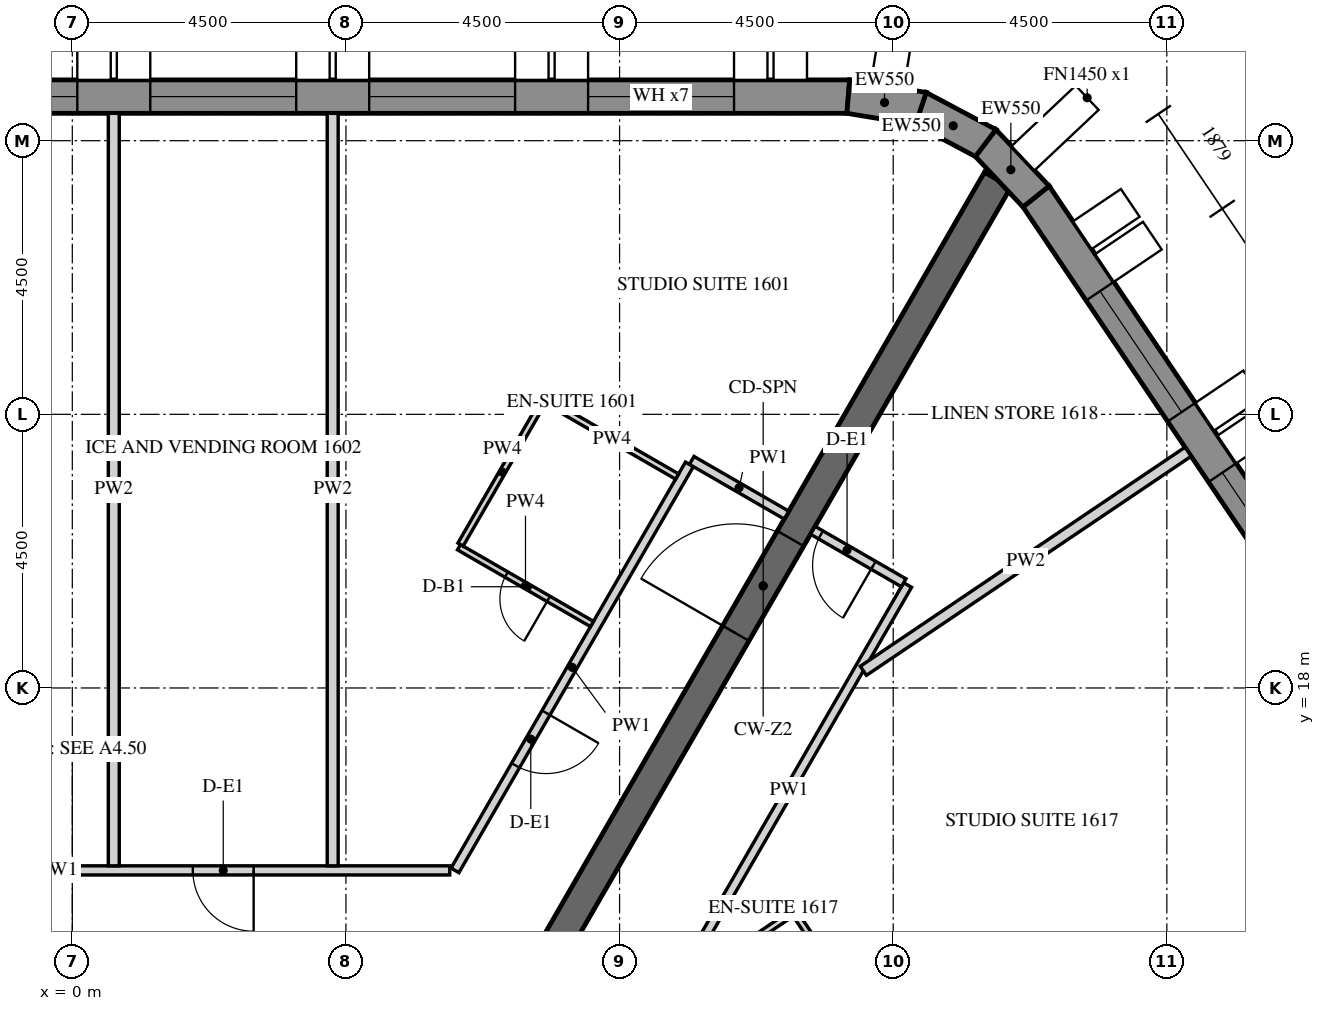
"""IFC4 building model, lengths in metres.
Left out: names, types, materials, properties, quantities, classifications, styles, units other than length and angle.
Written with IfcOpenShell. Run it as: python <this file> out.ifc"""

import sys

from ifc_helpers import new_model, si_unit, direction, frame, frame_2d, origin, place, context, subcontext, project, spatial, polyline, rectangle, outline, extrude, element, fill, save


model = new_model("IFC4")
c1 = context("Model", 3, precision=1e-05, world=origin(), true_north=direction((0.0, 1.0)))
c2 = subcontext(c1, "Body", "Model", "MODEL_VIEW")
j1 = project(units=[si_unit("LENGTHUNIT", "METRE"), si_unit("PLANEANGLEUNIT", "RADIAN")], contexts=[c1])
p1 = place(None, origin())
s1 = spatial("IfcSite", under=j1, at=p1, CompositionType="ELEMENT")
p2 = place(p1, origin())
s2 = spatial("IfcBuilding", under=s1, at=p2, CompositionType="ELEMENT")
p3 = place(p2, frame((0.0, 0.0, 207.3)))
s3 = spatial("IfcBuildingStorey", under=s2, at=p3, CompositionType="ELEMENT", Elevation=207.3)
p4 = place(p3, frame((12.761, 27.725, -0.15), z_axis=(0.0, 0.0, 1.0), x_axis=(-1.0, 0.0, 0.0)))
e1 = element("IfcWall", 1, at=p4, inside=s3, PredefinedType="SOLIDWALL", context=c2, shape_type="SweptSolid", body=[
    extrude(outline(polyline([(-0.022, -0.275), (27.783, -0.275), (27.732, 0.275), (0.022, 0.275), (-0.022, -0.275)])), origin(), (0.0, 0.0, 1.0), 3.9),
])
p5 = place(p4, frame((1.879, 0.0, 1.05)))
e2 = element("IfcOpeningElement", 2, at=p5, cuts=e1, PredefinedType="OPENING", context=c2, shape_type="SweptSolid", body=[
    extrude(rectangle(XDim=2.4, YDim=2.4, at=frame_2d((1.2, 1.2))), frame((0.0, 0.285, 0.0), z_axis=(0.0, -1.0, 0.0), x_axis=(1.0, 0.0, 0.0)), (0.0, 0.0, 1.0), 0.57),
])
p6 = place(p4, frame((5.479, 0.0, 1.05)))
e3 = element("IfcOpeningElement", 3, at=p6, cuts=e1, PredefinedType="OPENING", context=c2, shape_type="SweptSolid", body=[
    extrude(rectangle(XDim=2.4, YDim=2.4, at=frame_2d((1.2, 1.2))), frame((0.0, 0.285, 0.0), z_axis=(0.0, -1.0, 0.0), x_axis=(1.0, 0.0, 0.0)), (0.0, 0.0, 1.0), 0.57),
])
p7 = place(p4, frame((9.079, 0.0, 1.05)))
e4 = element("IfcOpeningElement", 4, at=p7, cuts=e1, PredefinedType="OPENING", context=c2, shape_type="SweptSolid", body=[
    extrude(rectangle(XDim=2.4, YDim=2.4, at=frame_2d((1.2, 1.2))), frame((0.0, 0.285, 0.0), z_axis=(0.0, -1.0, 0.0), x_axis=(1.0, 0.0, 0.0)), (0.0, 0.0, 1.0), 0.57),
])
p8 = place(p4, frame((12.679, 0.0, 1.05)))
e5 = element("IfcOpeningElement", 5, at=p8, cuts=e1, PredefinedType="OPENING", context=c2, shape_type="SweptSolid", body=[
    extrude(rectangle(XDim=2.4, YDim=2.4, at=frame_2d((1.2, 1.2))), frame((0.0, 0.285, 0.0), z_axis=(0.0, -1.0, 0.0), x_axis=(1.0, 0.0, 0.0)), (0.0, 0.0, 1.0), 0.57),
])
p9 = place(p4, frame((16.279, 0.0, 1.05)))
e6 = element("IfcOpeningElement", 6, at=p9, cuts=e1, PredefinedType="OPENING", context=c2, shape_type="SweptSolid", body=[
    extrude(rectangle(XDim=2.4, YDim=2.4, at=frame_2d((1.2, 1.2))), frame((0.0, 0.285, 0.0), z_axis=(0.0, -1.0, 0.0), x_axis=(1.0, 0.0, 0.0)), (0.0, 0.0, 1.0), 0.57),
])
p10 = place(p4, frame((19.879, 0.0, 1.05)))
e7 = element("IfcOpeningElement", 7, at=p10, cuts=e1, PredefinedType="OPENING", context=c2, shape_type="SweptSolid", body=[
    extrude(rectangle(XDim=2.4, YDim=2.4, at=frame_2d((1.2, 1.2))), frame((0.0, 0.285, 0.0), z_axis=(0.0, -1.0, 0.0), x_axis=(1.0, 0.0, 0.0)), (0.0, 0.0, 1.0), 0.57),
])
p11 = place(p4, frame((23.479, 0.0, 1.05)))
e8 = element("IfcOpeningElement", 8, at=p11, cuts=e1, PredefinedType="OPENING", context=c2, shape_type="SweptSolid", body=[
    extrude(rectangle(XDim=2.4, YDim=2.4, at=frame_2d((1.2, 1.2))), frame((0.0, 0.285, 0.0), z_axis=(0.0, -1.0, 0.0), x_axis=(1.0, 0.0, 0.0)), (0.0, 0.0, 1.0), 0.57),
])
p12 = place(p3, frame((31.371, 3.071, -0.15), z_axis=(0.0, 0.0, 1.0), x_axis=(-0.559189891278, 0.829039604297, 0.0)))
e9 = element("IfcWall", 9, at=p12, inside=s3, PredefinedType="SOLIDWALL", context=c2, shape_type="SweptSolid", body=[
    extrude(outline(polyline([(-0.026, -0.275), (27.781, -0.275), (27.736, 0.275), (0.026, 0.275), (-0.026, -0.275)])), origin(), (0.0, 0.0, 1.0), 3.9),
])
p13 = place(p12, frame((1.879, 0.0, 1.05)))
e10 = element("IfcOpeningElement", 10, at=p13, cuts=e9, PredefinedType="OPENING", context=c2, shape_type="SweptSolid", body=[
    extrude(rectangle(XDim=2.4, YDim=2.4, at=frame_2d((1.2, 1.2))), frame((0.0, 0.285, 0.0), z_axis=(0.0, -1.0, 0.0), x_axis=(1.0, 0.0, 0.0)), (0.0, 0.0, 1.0), 0.57),
])
p14 = place(p12, frame((5.479, 0.0, 1.05)))
e11 = element("IfcOpeningElement", 11, at=p14, cuts=e9, PredefinedType="OPENING", context=c2, shape_type="SweptSolid", body=[
    extrude(rectangle(XDim=2.4, YDim=2.4, at=frame_2d((1.2, 1.2))), frame((0.0, 0.285, 0.0), z_axis=(0.0, -1.0, 0.0), x_axis=(1.0, 0.0, 0.0)), (0.0, 0.0, 1.0), 0.57),
])
p15 = place(p12, frame((9.079, 0.0, 1.05)))
e12 = element("IfcOpeningElement", 12, at=p15, cuts=e9, PredefinedType="OPENING", context=c2, shape_type="SweptSolid", body=[
    extrude(rectangle(XDim=2.4, YDim=2.4, at=frame_2d((1.2, 1.2))), frame((0.0, 0.285, 0.0), z_axis=(0.0, -1.0, 0.0), x_axis=(1.0, 0.0, 0.0)), (0.0, 0.0, 1.0), 0.57),
])
p16 = place(p12, frame((12.679, 0.0, 1.05)))
e13 = element("IfcOpeningElement", 13, at=p16, cuts=e9, PredefinedType="OPENING", context=c2, shape_type="SweptSolid", body=[
    extrude(rectangle(XDim=2.4, YDim=2.4, at=frame_2d((1.2, 1.2))), frame((0.0, 0.285, 0.0), z_axis=(0.0, -1.0, 0.0), x_axis=(1.0, 0.0, 0.0)), (0.0, 0.0, 1.0), 0.57),
])
p17 = place(p12, frame((16.279, 0.0, 1.05)))
e14 = element("IfcOpeningElement", 14, at=p17, cuts=e9, PredefinedType="OPENING", context=c2, shape_type="SweptSolid", body=[
    extrude(rectangle(XDim=2.4, YDim=2.4, at=frame_2d((1.2, 1.2))), frame((0.0, 0.285, 0.0), z_axis=(0.0, -1.0, 0.0), x_axis=(1.0, 0.0, 0.0)), (0.0, 0.0, 1.0), 0.57),
])
p18 = place(p12, frame((19.879, 0.0, 1.05)))
e15 = element("IfcOpeningElement", 15, at=p18, cuts=e9, PredefinedType="OPENING", context=c2, shape_type="SweptSolid", body=[
    extrude(rectangle(XDim=2.4, YDim=2.4, at=frame_2d((1.2, 1.2))), frame((0.0, 0.285, 0.0), z_axis=(0.0, -1.0, 0.0), x_axis=(1.0, 0.0, 0.0)), (0.0, 0.0, 1.0), 0.57),
])
p19 = place(p12, frame((23.479, 0.0, 1.05)))
e16 = element("IfcOpeningElement", 16, at=p19, cuts=e9, PredefinedType="OPENING", context=c2, shape_type="SweptSolid", body=[
    extrude(rectangle(XDim=2.4, YDim=2.4, at=frame_2d((1.2, 1.2))), frame((0.0, 0.285, 0.0), z_axis=(0.0, -1.0, 0.0), x_axis=(1.0, 0.0, 0.0)), (0.0, 0.0, 1.0), 0.57),
])
p20 = place(p3, frame((15.849, 26.083, -0.15), z_axis=(0.0, 0.0, 1.0), x_axis=(-0.686196220404, 0.727416488061, 0.0)))
e17 = element("IfcWall", 17, at=p20, inside=s3, PredefinedType="SOLIDWALL", context=c2, shape_type="SweptSolid", body=[
    extrude(outline(polyline([(-0.022, -0.275), (1.253, -0.275), (1.163, 0.275), (0.022, 0.275), (-0.022, -0.275)])), origin(), (0.0, 0.0, 1.0), 3.9),
])
p21 = place(p3, frame((15.02, 26.962, -0.15), z_axis=(0.0, 0.0, 1.0), x_axis=(-0.882950818639, 0.469465495926, 0.0)))
e18 = element("IfcWall", 18, at=p21, inside=s3, PredefinedType="SOLIDWALL", context=c2, shape_type="SweptSolid", body=[
    extrude(outline(polyline([(-0.045, -0.275), (1.253, -0.275), (1.163, 0.275), (0.045, 0.275), (-0.045, -0.275)])), origin(), (0.0, 0.0, 1.0), 3.9),
])
p22 = place(p3, frame((13.953, 27.529, -0.15), z_axis=(0.0, 0.0, 1.0), x_axis=(-0.986751945211, 0.162236243244, 0.0)))
e19 = element("IfcWall", 19, at=p22, inside=s3, PredefinedType="SOLIDWALL", context=c2, shape_type="SweptSolid", body=[
    extrude(outline(polyline([(-0.045, -0.275), (1.231, -0.275), (1.186, 0.275), (0.045, 0.275), (-0.045, -0.275)])), origin(), (0.0, 0.0, 1.0), 3.9),
])
p23 = place(p3, frame((7.506, 13.0, -0.15), z_axis=(0.0, 0.0, 1.0), x_axis=(0.499988271576, 0.866032175087, 0.0)))
e20 = element("IfcWall", 20, at=p23, inside=s3, PredefinedType="SHEAR", context=c2, shape_type="SweptSolid", body=[
    extrude(rectangle(XDim=15.424, YDim=0.5, at=frame_2d((7.712, 0.0))), origin(), (0.0, 0.0, 1.0), 3.9),
])
p24 = place(p23, frame((6.812, 0.0, 0.15)))
e21 = element("IfcOpeningElement", 21, at=p24, cuts=e20, PredefinedType="OPENING", context=c2, shape_type="SweptSolid", body=[
    extrude(rectangle(XDim=1.8, YDim=2.4, at=frame_2d((0.9, 1.2))), frame((0.0, 0.26, 0.0), z_axis=(0.0, -1.0, 0.0), x_axis=(1.0, 0.0, 0.0)), (0.0, 0.0, 1.0), 0.52),
])
p25 = place(p3, frame((10.149, 21.678, 0.0), z_axis=(0.0, 0.0, 1.0), x_axis=(-0.499993780622, -0.866028994514, 0.0)))
e22 = element("IfcWall", 22, at=p25, inside=s3, PredefinedType="PARTITIONING", context=c2, shape_type="SweptSolid", body=[
    extrude(rectangle(XDim=7.711, YDim=0.15, at=frame_2d((3.855, 0.0))), origin(), (0.0, 0.0, 1.0), 2.988),
])
p26 = place(p25, frame((4.718, 0.0, 0.0)))
e23 = element("IfcOpeningElement", 23, at=p26, cuts=e22, PredefinedType="OPENING", context=c2, shape_type="SweptSolid", body=[
    extrude(rectangle(XDim=1.0, YDim=2.1, at=frame_2d((0.5, 1.05))), frame((0.0, 0.085, 0.0), z_axis=(0.0, -1.0, 0.0), x_axis=(1.0, 0.0, 0.0)), (0.0, 0.0, 1.0), 0.17),
])
p27 = place(p3, frame((6.207, 15.0, 0.0), z_axis=(0.0, 0.0, 1.0), x_axis=(-1.0, 0.0, 0.0)))
e24 = element("IfcWall", 24, at=p27, inside=s3, PredefinedType="PARTITIONING", context=c2, shape_type="SweptSolid", body=[
    extrude(rectangle(XDim=14.867, YDim=0.15, at=frame_2d((7.433, 0.0))), origin(), (0.0, 0.0, 1.0), 2.988),
])
p28 = place(p27, frame((3.224, 0.0, 0.0)))
e25 = element("IfcOpeningElement", 25, at=p28, cuts=e24, PredefinedType="OPENING", context=c2, shape_type="SweptSolid", body=[
    extrude(rectangle(XDim=1.0, YDim=2.1, at=frame_2d((0.5, 1.05))), frame((0.0, 0.085, 0.0), z_axis=(0.0, -1.0, 0.0), x_axis=(1.0, 0.0, 0.0)), (0.0, 0.0, 1.0), 0.17),
])
p29 = place(p27, frame((7.224, 0.0, 0.0)))
e26 = element("IfcOpeningElement", 26, at=p29, cuts=e24, PredefinedType="OPENING", context=c2, shape_type="SweptSolid", body=[
    extrude(rectangle(XDim=1.0, YDim=2.1, at=frame_2d((0.5, 1.05))), frame((0.0, 0.085, 0.0), z_axis=(0.0, -1.0, 0.0), x_axis=(1.0, 0.0, 0.0)), (0.0, 0.0, 1.0), 0.17),
])
p30 = place(p27, frame((13.667, 0.0, 0.0)))
e27 = element("IfcOpeningElement", 27, at=p30, cuts=e24, PredefinedType="OPENING", context=c2, shape_type="SweptSolid", body=[
    extrude(rectangle(XDim=1.0, YDim=2.1, at=frame_2d((0.5, 1.05))), frame((0.0, 0.085, 0.0), z_axis=(0.0, -1.0, 0.0), x_axis=(1.0, 0.0, 0.0)), (0.0, 0.0, 1.0), 0.17),
])
p31 = place(p3, frame((11.745, 20.843, 0.0), z_axis=(0.0, 0.0, 1.0), x_axis=(-0.865989075817, 0.500062916607, 0.0)))
e28 = element("IfcWall", 28, at=p31, inside=s3, PredefinedType="PARTITIONING", context=c2, shape_type="SweptSolid", body=[
    extrude(rectangle(XDim=1.8, YDim=0.15, at=frame_2d((0.9, 0.0))), origin(), (0.0, 0.0, 1.0), 2.988),
])
p32 = place(p3, frame((9.844, 12.95, 0.0), z_axis=(0.0, 0.0, 1.0), x_axis=(0.500003831281, 0.866023191782, 0.0)))
e29 = element("IfcWall", 29, at=p32, inside=s3, PredefinedType="PARTITIONING", context=c2, shape_type="SweptSolid", body=[
    extrude(rectangle(XDim=7.786, YDim=0.15, at=frame_2d((3.893, 0.0))), origin(), (0.0, 0.0, 1.0), 2.988),
])
p33 = place(p3, frame((13.672, 19.73, 0.0), z_axis=(0.0, 0.0, 1.0), x_axis=(-0.866074815912, 0.499914405916, 0.0)))
e30 = element("IfcWall", 30, at=p33, inside=s3, PredefinedType="PARTITIONING", context=c2, shape_type="SweptSolid", body=[
    extrude(rectangle(XDim=1.725, YDim=0.15, at=frame_2d((0.862, 0.0))), origin(), (0.0, 0.0, 1.0), 2.988),
])
p34 = place(p33, frame((0.575, 0.0, 0.0)))
e31 = element("IfcOpeningElement", 31, at=p34, cuts=e30, PredefinedType="OPENING", context=c2, shape_type="SweptSolid", body=[
    extrude(rectangle(XDim=1.0, YDim=2.1, at=frame_2d((0.5, 1.05))), frame((0.0, 0.085, 0.0), z_axis=(0.0, -1.0, 0.0), x_axis=(1.0, 0.0, 0.0)), (0.0, 0.0, 1.0), 0.17),
])
p35 = place(p3, frame((8.546, 19.052, 0.0), z_axis=(0.0, 0.0, 1.0), x_axis=(-0.866039067339, 0.499976333282, 0.0)))
e32 = element("IfcWall", 32, at=p35, inside=s3, PredefinedType="PARTITIONING", context=c2, shape_type="SweptSolid", body=[
    extrude(rectangle(XDim=2.525, YDim=0.1, at=frame_2d((1.262, 0.0))), origin(), (0.0, 0.0, 1.0), 2.988),
])
p36 = place(p35, frame((0.825, 0.0, 0.0)))
e33 = element("IfcOpeningElement", 33, at=p36, cuts=e32, PredefinedType="OPENING", context=c2, shape_type="SweptSolid", body=[
    extrude(rectangle(XDim=0.8, YDim=2.1, at=frame_2d((0.4, 1.05))), frame((0.0, 0.06, 0.0), z_axis=(0.0, -1.0, 0.0), x_axis=(1.0, 0.0, 0.0)), (0.0, 0.0, 1.0), 0.12),
])
p37 = place(p3, frame((6.385, 20.358, 0.0), z_axis=(0.0, 0.0, 1.0), x_axis=(0.499996545922, 0.866027397988, 0.0)))
e34 = element("IfcWall", 34, at=p37, inside=s3, PredefinedType="PARTITIONING", context=c2, shape_type="SweptSolid", body=[
    extrude(rectangle(XDim=2.75, YDim=0.1, at=frame_2d((1.375, 0.0))), origin(), (0.0, 0.0, 1.0), 2.988),
])
p38 = place(p3, frame((7.803, 22.715, 0.0), z_axis=(0.0, 0.0, 1.0), x_axis=(0.866006523861, -0.500032699561, 0.0)))
e35 = element("IfcWall", 35, at=p38, inside=s3, PredefinedType="PARTITIONING", context=c2, shape_type="SweptSolid", body=[
    extrude(rectangle(XDim=2.475, YDim=0.1, at=frame_2d((1.237, 0.0))), origin(), (0.0, 0.0, 1.0), 2.988),
])
for number, where, z_axis, x_axis in (
    (36, (4.282, 27.45, 0.0), (0.0, 0.0, 1.0), (0.0, -1.0, 0.0)),
    (37, (0.682, 27.45, 0.0), (0.0, 0.0, 1.0), (0.0, -1.0, 0.0)),
):
    element("IfcWall", number, at=place(p3, frame(where, z_axis=z_axis, x_axis=x_axis)), inside=s3, PredefinedType="PARTITIONING", context=c2, shape_type="SweptSolid", body=[
        extrude(rectangle(XDim=12.375, YDim=0.18, at=frame_2d((6.188, 0.0))), origin(), (0.0, 0.0, 1.0), 2.988),
    ])
p39 = place(p3, frame((22.376, 15.915, 0.0), z_axis=(0.0, 0.0, 1.0), x_axis=(-0.829034008237, -0.559198187753, 0.0)))
e38 = element("IfcWall", 38, at=p39, inside=s3, PredefinedType="PARTITIONING", context=c2, shape_type="SweptSolid", body=[
    extrude(rectangle(XDim=12.291, YDim=0.18, at=frame_2d((6.145, 0.0))), origin(), (0.0, 0.0, 1.0), 2.988),
])
p40 = place(p3, frame((9.986, 13.046, 0.0), z_axis=(0.0, 0.0, 1.0), x_axis=(0.829043139518, 0.55918465002, 0.0)))
e39 = element("IfcWall", 39, at=p40, inside=s3, PredefinedType="PARTITIONING", context=c2, shape_type="SweptSolid", body=[
    extrude(rectangle(XDim=2.27, YDim=0.1, at=frame_2d((1.135, 0.0))), origin(), (0.0, 0.0, 1.0), 2.988),
])
p41 = place(p3, frame((11.896, 14.273, 0.0), z_axis=(0.0, 0.0, 1.0), x_axis=(0.559155442782, -0.829062838878, 0.0)))
e40 = element("IfcWall", 40, at=p41, inside=s3, PredefinedType="PARTITIONING", context=c2, shape_type="SweptSolid", body=[
    extrude(rectangle(XDim=2.55, YDim=0.1, at=frame_2d((1.275, 0.0))), origin(), (0.0, 0.0, 1.0), 2.988),
])
p42 = place(p3, frame((18.35, 21.884, 0.0), z_axis=(0.0, 0.0, 1.0), x_axis=(-0.829047205772, -0.559178621374, 0.0)))
e41 = element("IfcWall", 41, at=p42, inside=s3, PredefinedType="PARTITIONING", context=c2, shape_type="SweptSolid", body=[
    extrude(rectangle(XDim=6.442, YDim=0.18, at=frame_2d((3.221, 0.0))), origin(), (0.0, 0.0, 1.0), 2.988),
])
p43 = place(p5, frame((0.0, 0.205, 0.0)))
e42 = element("IfcWindow", 42, at=p43, inside=s3, PartitioningType="DOUBLE_PANEL_VERTICAL", PredefinedType="WINDOW", context=c2, shape_type="SweptSolid", body=[
    extrude(rectangle(XDim=2.4, YDim=2.4, at=frame_2d((1.2, 1.2))), frame((0.0, 0.03, 0.0), z_axis=(0.0, -1.0, 0.0), x_axis=(1.0, 0.0, 0.0)), (0.0, 0.0, 1.0), 0.06),
])
fill(e2, e42)
p44 = place(p6, frame((0.0, 0.205, 0.0)))
e43 = element("IfcWindow", 43, at=p44, inside=s3, PartitioningType="DOUBLE_PANEL_VERTICAL", PredefinedType="WINDOW", context=c2, shape_type="SweptSolid", body=[
    extrude(rectangle(XDim=2.4, YDim=2.4, at=frame_2d((1.2, 1.2))), frame((0.0, 0.03, 0.0), z_axis=(0.0, -1.0, 0.0), x_axis=(1.0, 0.0, 0.0)), (0.0, 0.0, 1.0), 0.06),
])
fill(e3, e43)
p45 = place(p7, frame((0.0, 0.205, 0.0)))
e44 = element("IfcWindow", 44, at=p45, inside=s3, PartitioningType="DOUBLE_PANEL_VERTICAL", PredefinedType="WINDOW", context=c2, shape_type="SweptSolid", body=[
    extrude(rectangle(XDim=2.4, YDim=2.4, at=frame_2d((1.2, 1.2))), frame((0.0, 0.03, 0.0), z_axis=(0.0, -1.0, 0.0), x_axis=(1.0, 0.0, 0.0)), (0.0, 0.0, 1.0), 0.06),
])
fill(e4, e44)
p46 = place(p8, frame((0.0, 0.205, 0.0)))
e45 = element("IfcWindow", 45, at=p46, inside=s3, PartitioningType="DOUBLE_PANEL_VERTICAL", PredefinedType="WINDOW", context=c2, shape_type="SweptSolid", body=[
    extrude(rectangle(XDim=2.4, YDim=2.4, at=frame_2d((1.2, 1.2))), frame((0.0, 0.03, 0.0), z_axis=(0.0, -1.0, 0.0), x_axis=(1.0, 0.0, 0.0)), (0.0, 0.0, 1.0), 0.06),
])
fill(e5, e45)
p47 = place(p18, frame((0.0, 0.205, 0.0)))
e46 = element("IfcWindow", 46, at=p47, inside=s3, PartitioningType="DOUBLE_PANEL_VERTICAL", PredefinedType="WINDOW", context=c2, shape_type="SweptSolid", body=[
    extrude(rectangle(XDim=2.4, YDim=2.4, at=frame_2d((1.2, 1.2))), frame((0.0, 0.03, 0.0), z_axis=(0.0, -1.0, 0.0), x_axis=(1.0, 0.0, 0.0)), (0.0, 0.0, 1.0), 0.06),
])
fill(e15, e46)
p48 = place(p19, frame((0.0, 0.205, 0.0)))
e47 = element("IfcWindow", 47, at=p48, inside=s3, PartitioningType="DOUBLE_PANEL_VERTICAL", PredefinedType="WINDOW", context=c2, shape_type="SweptSolid", body=[
    extrude(rectangle(XDim=2.4, YDim=2.4, at=frame_2d((1.2, 1.2))), frame((0.0, 0.03, 0.0), z_axis=(0.0, -1.0, 0.0), x_axis=(1.0, 0.0, 0.0)), (0.0, 0.0, 1.0), 0.06),
])
fill(e16, e47)
p49 = place(p24, origin())
e48 = element("IfcDoor", 48, at=p49, inside=s3, OperationType="DOUBLE_DOOR_SINGLE_SWING", PredefinedType="DOOR", context=c2, shape_type="SweptSolid", body=[
    extrude(rectangle(XDim=1.8, YDim=2.4, at=frame_2d((0.9, 1.2))), frame((0.0, 0.025, 0.0), z_axis=(0.0, -1.0, 0.0), x_axis=(1.0, 0.0, 0.0)), (0.0, 0.0, 1.0), 0.05),
])
fill(e21, e48)
p50 = place(p26, origin())
e49 = element("IfcDoor", 49, at=p50, inside=s3, OperationType="SINGLE_SWING_LEFT", PredefinedType="DOOR", context=c2, shape_type="SweptSolid", body=[
    extrude(rectangle(XDim=1.0, YDim=2.1, at=frame_2d((0.5, 1.05))), frame((0.0, 0.025, 0.0), z_axis=(0.0, -1.0, 0.0), x_axis=(1.0, 0.0, 0.0)), (0.0, 0.0, 1.0), 0.05),
])
fill(e23, e49)
p51 = place(p36, origin())
e50 = element("IfcDoor", 50, at=p51, inside=s3, OperationType="SINGLE_SWING_RIGHT", PredefinedType="DOOR", context=c2, shape_type="SweptSolid", body=[
    extrude(rectangle(XDim=0.8, YDim=2.1, at=frame_2d((0.4, 1.05))), frame((0.0, 0.025, 0.0), z_axis=(0.0, -1.0, 0.0), x_axis=(1.0, 0.0, 0.0)), (0.0, 0.0, 1.0), 0.05),
])
fill(e33, e50)
p52 = place(p28, origin())
e51 = element("IfcDoor", 51, at=p52, inside=s3, OperationType="SINGLE_SWING_RIGHT", PredefinedType="DOOR", context=c2, shape_type="SweptSolid", body=[
    extrude(rectangle(XDim=1.0, YDim=2.1, at=frame_2d((0.5, 1.05))), frame((0.0, 0.025, 0.0), z_axis=(0.0, -1.0, 0.0), x_axis=(1.0, 0.0, 0.0)), (0.0, 0.0, 1.0), 0.05),
])
fill(e25, e51)
p53 = place(p34, origin())
e52 = element("IfcDoor", 52, at=p53, inside=s3, OperationType="SINGLE_SWING_LEFT", PredefinedType="DOOR", context=c2, shape_type="SweptSolid", body=[
    extrude(rectangle(XDim=1.0, YDim=2.1, at=frame_2d((0.5, 1.05))), frame((0.0, 0.025, 0.0), z_axis=(0.0, -1.0, 0.0), x_axis=(1.0, 0.0, 0.0)), (0.0, 0.0, 1.0), 0.05),
])
fill(e31, e52)
save(model, sys.argv[1])
